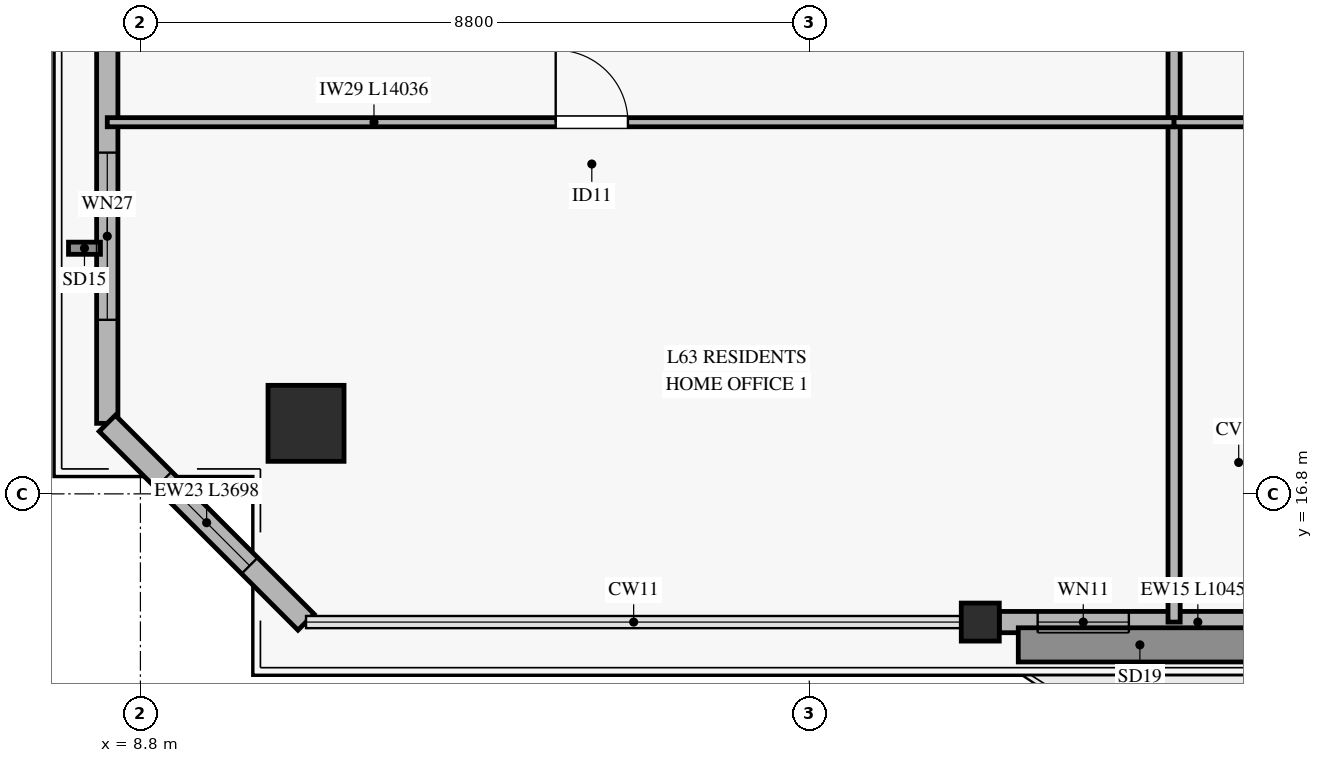
"""IFC4 building model, lengths in metres.
Left out: names, types, materials, properties, quantities, classifications, styles, units other than length and angle.
Written with IfcOpenShell. Run it as: python <this file> out.ifc"""

import sys

from ifc_helpers import new_model, si_unit, direction, frame, frame_2d, origin, origin_2d, place, context, subcontext, project, spatial, rectangle, hollow_rectangle, extrude, source, transform, mapped, element, fill, save


model = new_model("IFC4")
c1 = context("Model", 3, precision=1e-05, world=origin(), true_north=direction((0.0, 1.0)))
c2 = subcontext(c1, "Body", "Model", "MODEL_VIEW")
j1 = project(units=[si_unit("LENGTHUNIT", "METRE"), si_unit("PLANEANGLEUNIT", "RADIAN")], contexts=[c1])
p1 = place(None, origin())
s1 = spatial("IfcSite", under=j1, at=p1, CompositionType="ELEMENT")
p2 = place(p1, origin())
s2 = spatial("IfcBuilding", under=s1, at=p2, CompositionType="ELEMENT")
p3 = place(p2, frame((0.0, 0.0, 248.5)))
s3 = spatial("IfcBuildingStorey", under=s2, at=p3, CompositionType="ELEMENT", Elevation=248.5)
m1 = source(origin(), c2, "Body", "SweptSolid", [
    extrude(hollow_rectangle(XDim=1.0, YDim=1.0, WallThickness=0.045, at=origin_2d()), origin(), (0.0, 0.0, 1.0), 3.185),
])
p4 = place(p3, frame((10.979, 17.728, 0.0), z_axis=(0.0, 0.0, 1.0), x_axis=(1.0, 0.0, 0.0)))
e1 = element("IfcColumn", 1, at=p4, inside=s3, PredefinedType="COLUMN", context=c2, shape_type="MappedRepresentation", body=[
    mapped(m1, transform((0.0, 0.0, 0.0), x_axis=(1.0, 0.0, 0.0), y_axis=(0.0, 1.0, 0.0), z_axis=(0.0, 0.0, 1.0), scale=1.0)),
])
m2 = source(origin(), c2, "Body", "SweptSolid", [
    extrude(hollow_rectangle(XDim=0.5, YDim=0.5, WallThickness=0.024, at=origin_2d()), origin(), (0.0, 0.0, 1.0), 3.185),
])
p5 = place(p3, frame((19.85, 15.113, 0.0), z_axis=(0.0, 0.0, 1.0), x_axis=(1.0, 0.0, 0.0)))
e2 = element("IfcColumn", 2, at=p5, inside=s3, PredefinedType="COLUMN", context=c2, shape_type="MappedRepresentation", body=[
    mapped(m2, transform((0.0, 0.0, 0.0), x_axis=(1.0, 0.0, 0.0), y_axis=(0.0, 1.0, 0.0), z_axis=(0.0, 0.0, 1.0), scale=1.0)),
])
p6 = place(p3, frame((20.1, 15.113, 0.0), z_axis=(0.0, 0.0, 1.0), x_axis=(1.0, 0.0, 0.0)))
e3 = element("IfcWall", 3, at=p6, inside=s3, PredefinedType="SOLIDWALL", context=c2, shape_type="SweptSolid", body=[
    extrude(rectangle(XDim=10.45, YDim=0.28, at=frame_2d((5.225, 0.0))), origin(), (0.0, 0.0, 1.0), 2.815),
])
p7 = place(p6, frame((4.3, 0.0, 0.0)))
e4 = element("IfcOpeningElement", 4, at=p7, cuts=e3, PredefinedType="OPENING", context=c2, shape_type="SweptSolid", body=[
    extrude(rectangle(XDim=1.8, YDim=2.25, at=frame_2d((0.9, 1.125))), frame((0.0, 0.15, 0.0), z_axis=(0.0, -1.0, 0.0), x_axis=(1.0, 0.0, 0.0)), (0.0, 0.0, 1.0), 0.3),
])
p8 = place(p6, frame((0.505, 0.0, 0.45)))
e5 = element("IfcOpeningElement", 5, at=p8, cuts=e3, PredefinedType="OPENING", context=c2, shape_type="SweptSolid", body=[
    extrude(rectangle(XDim=1.2, YDim=2.0, at=frame_2d((0.6, 1.0))), frame((0.0, 0.15, 0.0), z_axis=(0.0, -1.0, 0.0), x_axis=(1.0, 0.0, 0.0)), (0.0, 0.0, 1.0), 0.3),
])
p9 = place(p6, frame((6.48, 0.0, 0.45)))
e6 = element("IfcOpeningElement", 6, at=p9, cuts=e3, PredefinedType="OPENING", context=c2, shape_type="SweptSolid", body=[
    extrude(rectangle(XDim=1.6, YDim=2.0, at=frame_2d((0.8, 1.0))), frame((0.0, 0.15, 0.0), z_axis=(0.0, -1.0, 0.0), x_axis=(1.0, 0.0, 0.0)), (0.0, 0.0, 1.0), 0.3),
])
p10 = place(p3, frame((8.364, 17.728, 0.0), z_axis=(0.0, 0.0, 1.0), x_axis=(0.0, 1.0, 0.0)))
e7 = element("IfcWall", 7, at=p10, inside=s3, PredefinedType="SOLIDWALL", context=c2, shape_type="SweptSolid", body=[
    extrude(rectangle(XDim=12.629, YDim=0.28, at=frame_2d((6.314, 0.0))), origin(), (0.0, 0.0, 1.0), 2.815),
])
p11 = place(p10, frame((1.362, 0.0, 0.45)))
e8 = element("IfcOpeningElement", 8, at=p11, cuts=e7, PredefinedType="OPENING", context=c2, shape_type="SweptSolid", body=[
    extrude(rectangle(XDim=2.2, YDim=2.1, at=frame_2d((1.1, 1.05))), frame((0.0, 0.15, 0.0), z_axis=(0.0, -1.0, 0.0), x_axis=(1.0, 0.0, 0.0)), (0.0, 0.0, 1.0), 0.3),
])
p12 = place(p10, frame((7.74, 0.0, 0.45)))
e9 = element("IfcOpeningElement", 9, at=p12, cuts=e7, PredefinedType="OPENING", context=c2, shape_type="SweptSolid", body=[
    extrude(rectangle(XDim=2.2, YDim=2.1, at=frame_2d((1.1, 1.05))), frame((0.0, 0.15, 0.0), z_axis=(0.0, -1.0, 0.0), x_axis=(1.0, 0.0, 0.0)), (0.0, 0.0, 1.0), 0.3),
])
p13 = place(p3, frame((8.364, 17.728, 0.0), z_axis=(0.0, 0.0, 1.0), x_axis=(0.707106781187, -0.707106781187, 0.0)))
e10 = element("IfcWall", 10, at=p13, inside=s3, PredefinedType="SOLIDWALL", context=c2, shape_type="SweptSolid", body=[
    extrude(rectangle(XDim=3.698, YDim=0.3, at=frame_2d((1.849, 0.0))), origin(), (0.0, 0.0, 1.0), 2.815),
])
p14 = place(p13, frame((1.049, 0.0, 0.45)))
e11 = element("IfcOpeningElement", 11, at=p14, cuts=e10, PredefinedType="OPENING", context=c2, shape_type="SweptSolid", body=[
    extrude(rectangle(XDim=1.6, YDim=2.0, at=frame_2d((0.8, 1.0))), frame((0.0, 0.16, 0.0), z_axis=(0.0, -1.0, 0.0), x_axis=(1.0, 0.0, 0.0)), (0.0, 0.0, 1.0), 0.32),
])
p15 = place(p3, frame((22.4, 15.113, 0.0), z_axis=(0.0, 0.0, 1.0), x_axis=(0.0, 1.0, 0.0)))
e12 = element("IfcWall", 12, at=p15, inside=s3, PredefinedType="PARTITIONING", context=c2, shape_type="SweptSolid", body=[
    extrude(rectangle(XDim=19.037, YDim=0.16, at=frame_2d((9.519, 0.0))), origin(), (0.0, 0.0, 1.0), 2.77),
])
p16 = place(p3, frame((8.364, 21.69, 0.0), z_axis=(0.0, 0.0, 1.0), x_axis=(1.0, 0.0, 0.0)))
e13 = element("IfcWall", 13, at=p16, inside=s3, PredefinedType="PARTITIONING", context=c2, shape_type="SweptSolid", body=[
    extrude(rectangle(XDim=14.036, YDim=0.12, at=frame_2d((7.018, 0.0))), origin(), (0.0, 0.0, 1.0), 2.47),
])
p17 = place(p16, frame((5.9, 0.0, 0.0)))
e14 = element("IfcOpeningElement", 14, at=p17, cuts=e13, PredefinedType="OPENING", context=c2, shape_type="SweptSolid", body=[
    extrude(rectangle(XDim=0.95, YDim=2.1, at=frame_2d((0.475, 1.05))), frame((0.0, 0.07, 0.0), z_axis=(0.0, -1.0, 0.0), x_axis=(1.0, 0.0, 0.0)), (0.0, 0.0, 1.0), 0.14),
])
p18 = place(p3, frame((22.4, 21.69, 0.0), z_axis=(0.0, 0.0, 1.0), x_axis=(1.0, 0.0, 0.0)))
e15 = element("IfcWall", 15, at=p18, inside=s3, PredefinedType="PARTITIONING", context=c2, shape_type="SweptSolid", body=[
    extrude(rectangle(XDim=6.2, YDim=0.12, at=frame_2d((3.1, 0.0))), origin(), (0.0, 0.0, 1.0), 3.185),
])
p19 = place(p18, frame((2.646, 0.0, 0.0)))
e16 = element("IfcOpeningElement", 16, at=p19, cuts=e15, PredefinedType="OPENING", context=c2, shape_type="SweptSolid", body=[
    extrude(rectangle(XDim=0.95, YDim=2.1, at=frame_2d((0.475, 1.05))), frame((0.0, 0.07, 0.0), z_axis=(0.0, -1.0, 0.0), x_axis=(1.0, 0.0, 0.0)), (0.0, 0.0, 1.0), 0.14),
])
m3 = source(origin(), c2, "Body", "SweptSolid", [
    extrude(rectangle(XDim=1.2, YDim=2.0, at=frame_2d((0.6, 1.0))), frame((0.0, 0.03, 0.0), z_axis=(0.0, -1.0, 0.0), x_axis=(1.0, 0.0, 0.0)), (0.0, 0.0, 1.0), 0.06),
])
p20 = place(p8, origin())
e17 = element("IfcWindow", 17, at=p20, inside=s3, PartitioningType="SINGLE_PANEL", PredefinedType="WINDOW", context=c2, shape_type="MappedRepresentation", body=[
    mapped(m3, transform((0.0, 0.0, 0.0), x_axis=(1.0, 0.0, 0.0), y_axis=(0.0, 1.0, 0.0), z_axis=(0.0, 0.0, 1.0), scale=1.0)),
])
fill(e5, e17)
m4 = source(origin(), c2, "Body", "SweptSolid", [
    extrude(rectangle(XDim=2.2, YDim=2.1, at=frame_2d((1.1, 1.05))), frame((0.0, 0.03, 0.0), z_axis=(0.0, -1.0, 0.0), x_axis=(1.0, 0.0, 0.0)), (0.0, 0.0, 1.0), 0.06),
])
p21 = place(p11, origin())
e18 = element("IfcWindow", 18, at=p21, inside=s3, PartitioningType="SINGLE_PANEL", PredefinedType="WINDOW", context=c2, shape_type="MappedRepresentation", body=[
    mapped(m4, transform((0.0, 0.0, 0.0), x_axis=(1.0, 0.0, 0.0), y_axis=(0.0, 1.0, 0.0), z_axis=(0.0, 0.0, 1.0), scale=1.0)),
])
fill(e8, e18)
m5 = source(origin(), c2, "Body", "SweptSolid", [
    extrude(rectangle(XDim=1.6, YDim=2.0, at=frame_2d((0.8, 1.0))), frame((0.0, 0.03, 0.0), z_axis=(0.0, -1.0, 0.0), x_axis=(1.0, 0.0, 0.0)), (0.0, 0.0, 1.0), 0.06),
])
p22 = place(p14, origin())
e19 = element("IfcWindow", 19, at=p22, inside=s3, PartitioningType="SINGLE_PANEL", PredefinedType="WINDOW", context=c2, shape_type="MappedRepresentation", body=[
    mapped(m5, transform((0.0, 0.0, 0.0), x_axis=(1.0, 0.0, 0.0), y_axis=(0.0, 1.0, 0.0), z_axis=(0.0, 0.0, 1.0), scale=1.0)),
])
fill(e11, e19)
m6 = source(origin(), c2, "Body", "SweptSolid", [
    extrude(rectangle(XDim=0.95, YDim=2.1, at=frame_2d((0.475, 1.05))), frame((0.0, 0.025, 0.0), z_axis=(0.0, -1.0, 0.0), x_axis=(1.0, 0.0, 0.0)), (0.0, 0.0, 1.0), 0.05),
])
p23 = place(p17, origin())
e20 = element("IfcDoor", 20, at=p23, inside=s3, OperationType="SINGLE_SWING_LEFT", PredefinedType="DOOR", context=c2, shape_type="MappedRepresentation", body=[
    mapped(m6, transform((0.0, 0.0, 0.0), x_axis=(1.0, 0.0, 0.0), y_axis=(0.0, 1.0, 0.0), z_axis=(0.0, 0.0, 1.0), scale=1.0)),
])
fill(e14, e20)
save(model, sys.argv[1])
